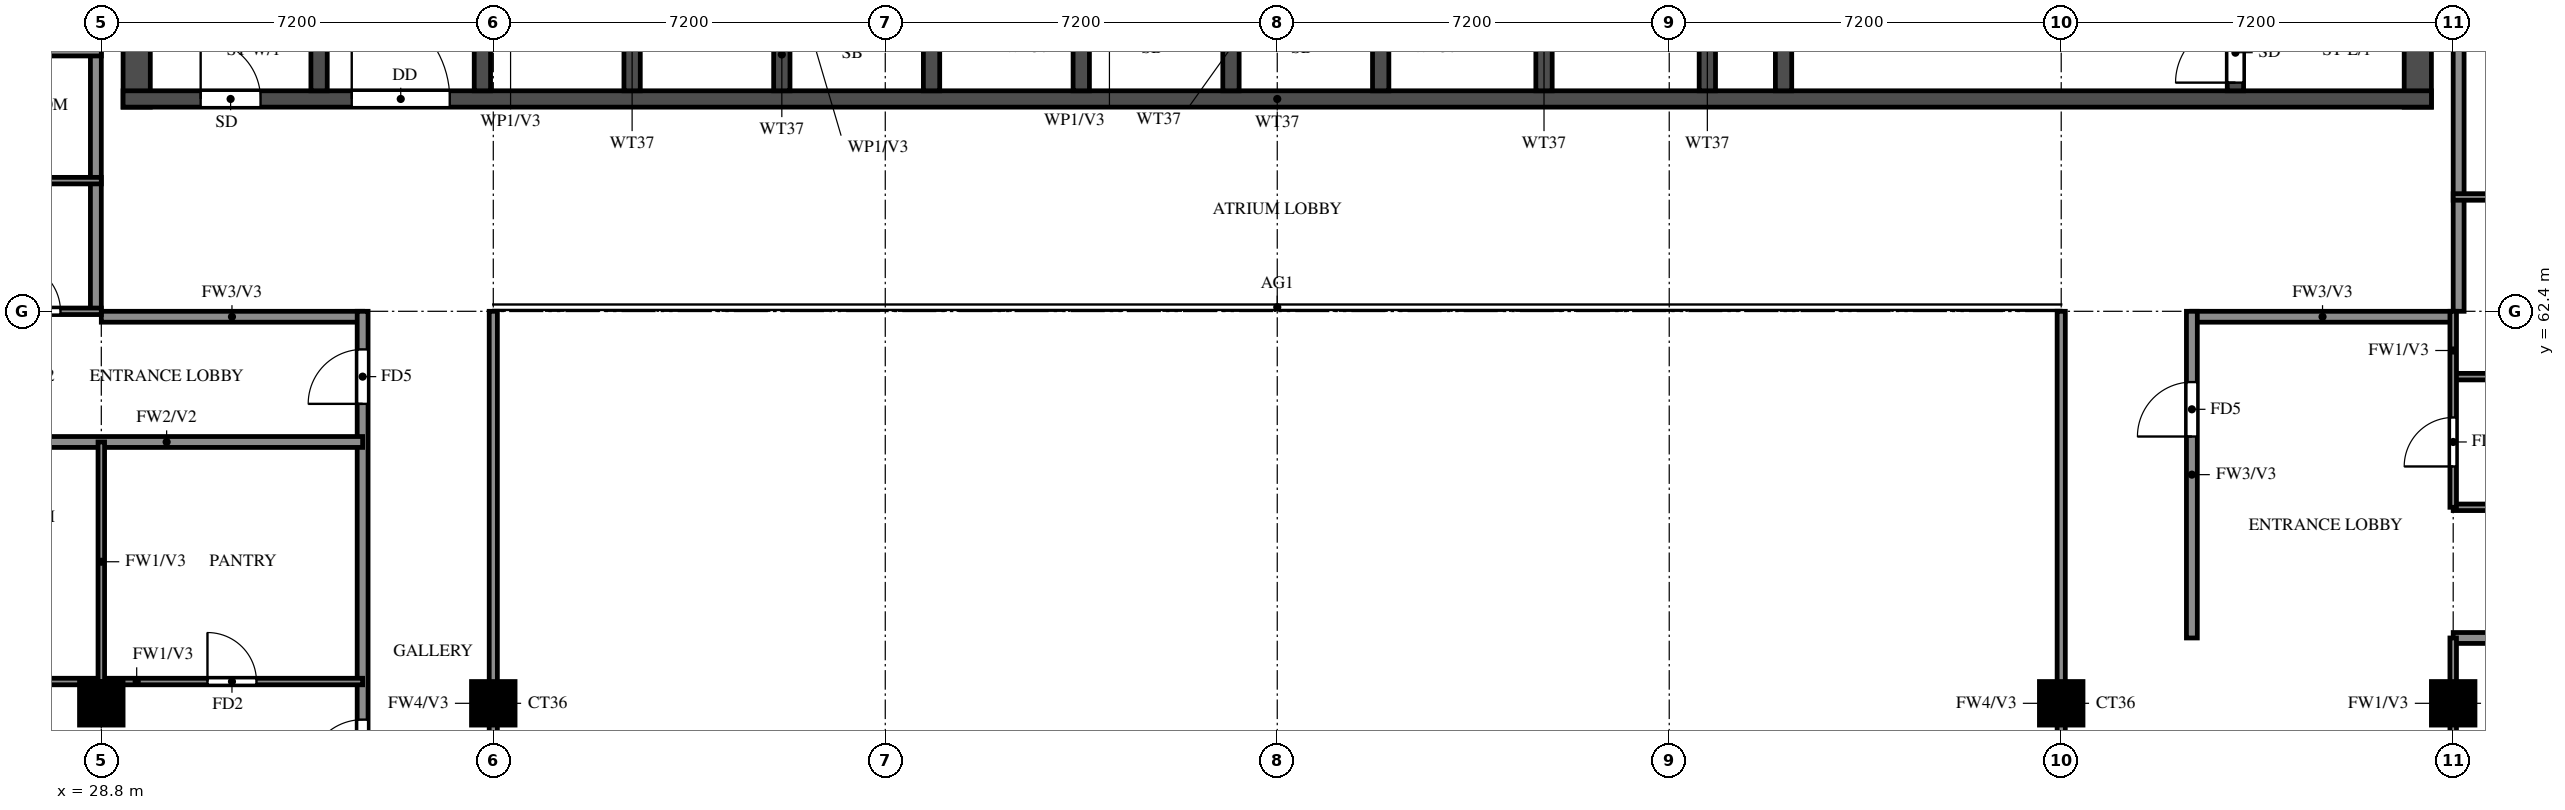
"""IFC4 building model, lengths in metres.
Left out: names, types, materials, properties, quantities, classifications, styles, units other than length and angle.
Written with IfcOpenShell. Run it as: python <this file> out.ifc"""

import sys

from ifc_helpers import new_model, si_unit, direction, frame, frame_2d, origin, origin_2d, place, context, subcontext, project, spatial, rectangle, extrude, source, transform, mapped, element, fill, save


model = new_model("IFC4")
c1 = context("Model", 3, precision=1e-05, world=origin(), true_north=direction((0.0, 1.0)))
c2 = subcontext(c1, "Body", "Model", "MODEL_VIEW")
j1 = project(units=[si_unit("LENGTHUNIT", "METRE"), si_unit("PLANEANGLEUNIT", "RADIAN")], contexts=[c1])
p1 = place(None, origin())
s1 = spatial("IfcSite", under=j1, at=p1, CompositionType="ELEMENT")
p2 = place(p1, origin())
s2 = spatial("IfcBuilding", under=s1, at=p2, CompositionType="ELEMENT")
p3 = place(p2, frame((0.0, 0.0, 243.0)))
s3 = spatial("IfcBuildingStorey", under=s2, at=p3, CompositionType="ELEMENT", Elevation=243.0)
m1 = source(origin(), c2, "Body", "SweptSolid", [
    extrude(rectangle(XDim=0.8, YDim=0.8, at=origin_2d()), origin(), (0.0, 0.0, 1.0), 3.22),
])
for number, where, z_axis, x_axis in (
    (1, (28.8, 55.2, 0.0), (0.0, 0.0, 1.0), (1.0, 0.0, 0.0)),
    (2, (36.0, 55.2, 0.0), (0.0, 0.0, 1.0), (1.0, 0.0, 0.0)),
    (3, (64.8, 55.2, 0.0), (0.0, 0.0, 1.0), (1.0, 0.0, 0.0)),
    (4, (72.0, 55.2, 0.0), (0.0, 0.0, 1.0), (1.0, 0.0, 0.0)),
):
    element("IfcColumn", number, at=place(p3, frame(where, z_axis=z_axis, x_axis=x_axis)), inside=s3, PredefinedType="COLUMN", context=c2, shape_type="MappedRepresentation", body=[
        mapped(m1, transform((0.0, 0.0, 0.0))),
    ])
for number, where, z_axis, x_axis in (
    (5, (29.45, 66.15, 0.0), (0.0, 0.0, 1.0), (0.0, 1.0, 0.0)),
    (6, (71.35, 66.15, 0.0), (0.0, 0.0, 1.0), (0.0, 1.0, 0.0)),
):
    element("IfcWall", number, at=place(p3, frame(where, z_axis=z_axis, x_axis=x_axis)), inside=s3, PredefinedType="SHEAR", context=c2, shape_type="SweptSolid", body=[
        extrude(rectangle(XDim=11.85, YDim=0.5, at=frame_2d((5.925, 0.0))), origin(), (0.0, 0.0, 1.0), 3.22),
    ])
p4 = place(p3, frame((29.2, 66.3, 0.0), z_axis=(0.0, 0.0, 1.0), x_axis=(1.0, 0.0, 0.0)))
e7 = element("IfcWall", 7, at=p4, inside=s3, PredefinedType="SHEAR", context=c2, shape_type="SweptSolid", body=[
    extrude(rectangle(XDim=42.4, YDim=0.3, at=frame_2d((21.2, 0.0))), origin(), (0.0, 0.0, 1.0), 3.22),
])
p5 = place(p4, frame((1.425, 0.0, 0.0)))
e8 = element("IfcOpeningElement", 8, at=p5, cuts=e7, PredefinedType="OPENING", context=c2, shape_type="SweptSolid", body=[
    extrude(rectangle(XDim=1.1, YDim=2.1, at=frame_2d((0.55, 1.05))), frame((0.0, 0.16, 0.0), z_axis=(0.0, -1.0, 0.0), x_axis=(1.0, 0.0, 0.0)), (0.0, 0.0, 1.0), 0.32),
])
p6 = place(p4, frame((4.2, 0.0, 0.0)))
e9 = element("IfcOpeningElement", 9, at=p6, cuts=e7, PredefinedType="OPENING", context=c2, shape_type="SweptSolid", body=[
    extrude(rectangle(XDim=1.8, YDim=2.1, at=frame_2d((0.9, 1.05))), frame((0.0, 0.16, 0.0), z_axis=(0.0, -1.0, 0.0), x_axis=(1.0, 0.0, 0.0)), (0.0, 0.0, 1.0), 0.32),
])
p7 = place(p3, frame((32.8, 66.45, 0.0), z_axis=(0.0, 0.0, 1.0), x_axis=(0.0, 1.0, 0.0)))
e10 = element("IfcWall", 10, at=p7, inside=s3, PredefinedType="SHEAR", context=c2, shape_type="SweptSolid", body=[
    extrude(rectangle(XDim=11.05, YDim=0.3, at=frame_2d((5.525, 0.0))), origin(), (0.0, 0.0, 1.0), 3.22),
])
p8 = place(p3, frame((68.0, 66.45, 0.0), z_axis=(0.0, 0.0, 1.0), x_axis=(0.0, 1.0, 0.0)))
e11 = element("IfcWall", 11, at=p8, inside=s3, PredefinedType="SHEAR", context=c2, shape_type="SweptSolid", body=[
    extrude(rectangle(XDim=11.05, YDim=0.3, at=frame_2d((5.525, 0.0))), origin(), (0.0, 0.0, 1.0), 3.22),
])
p9 = place(p8, frame((0.15, 0.0, 0.0)))
e12 = element("IfcOpeningElement", 12, at=p9, cuts=e11, PredefinedType="OPENING", context=c2, shape_type="SweptSolid", body=[
    extrude(rectangle(XDim=1.1, YDim=2.1, at=frame_2d((0.55, 1.05))), frame((0.0, 0.16, 0.0), z_axis=(0.0, -1.0, 0.0), x_axis=(1.0, 0.0, 0.0)), (0.0, 0.0, 1.0), 0.32),
])
p10 = place(p3, frame((59.7, 66.45, 0.0), z_axis=(0.0, 0.0, 1.0), x_axis=(0.0, 1.0, 0.0)))
e13 = element("IfcWall", 13, at=p10, inside=s3, PredefinedType="SHEAR", context=c2, shape_type="SweptSolid", body=[
    extrude(rectangle(XDim=6.175, YDim=0.3, at=frame_2d((3.087, 0.0))), origin(), (0.0, 0.0, 1.0), 3.22),
])
p11 = place(p10, frame((3.85, 0.0, 0.0)))
e14 = element("IfcOpeningElement", 14, at=p11, cuts=e13, PredefinedType="OPENING", context=c2, shape_type="SweptSolid", body=[
    extrude(rectangle(XDim=1.2, YDim=2.1, at=frame_2d((0.6, 1.05))), frame((0.0, 0.16, 0.0), z_axis=(0.0, -1.0, 0.0), x_axis=(1.0, 0.0, 0.0)), (0.0, 0.0, 1.0), 0.32),
])
for number, where, z_axis, x_axis in (
    (15, (35.8, 66.45, 0.0), (0.0, 0.0, 1.0), (0.0, 1.0, 0.0)),
    (16, (38.55, 66.45, 0.0), (0.0, 0.0, 1.0), (0.0, 1.0, 0.0)),
    (17, (41.3, 66.45, 0.0), (0.0, 0.0, 1.0), (0.0, 1.0, 0.0)),
    (18, (44.05, 66.45, 0.0), (0.0, 0.0, 1.0), (0.0, 1.0, 0.0)),
    (19, (46.8, 66.45, 0.0), (0.0, 0.0, 1.0), (0.0, 1.0, 0.0)),
    (20, (49.55, 66.45, 0.0), (0.0, 0.0, 1.0), (0.0, 1.0, 0.0)),
    (21, (52.3, 66.45, 0.0), (0.0, 0.0, 1.0), (0.0, 1.0, 0.0)),
    (22, (55.3, 66.45, 0.0), (0.0, 0.0, 1.0), (0.0, 1.0, 0.0)),
    (23, (58.3, 66.45, 0.0), (0.0, 0.0, 1.0), (0.0, 1.0, 0.0)),
):
    element("IfcWall", number, at=place(p3, frame(where, z_axis=z_axis, x_axis=x_axis)), inside=s3, PredefinedType="SHEAR", context=c2, shape_type="SweptSolid", body=[
        extrude(rectangle(XDim=2.425, YDim=0.3, at=frame_2d((1.212, 0.0))), origin(), (0.0, 0.0, 1.0), 3.22),
    ])
for number, where, z_axis, x_axis in (
    (24, (28.8, 62.3, 0.0), (0.0, 0.0, 1.0), (1.0, 0.0, 0.0)),
    (25, (67.2, 62.3, 0.0), (0.0, 0.0, 1.0), (1.0, 0.0, 0.0)),
):
    element("IfcWall", number, at=place(p3, frame(where, z_axis=z_axis, x_axis=x_axis)), inside=s3, PredefinedType="SOLIDWALL", context=c2, shape_type="SweptSolid", body=[
        extrude(rectangle(XDim=4.8, YDim=0.2, at=frame_2d((2.4, 0.0))), origin(), (0.0, 0.0, 1.0), 3.22),
    ])
p12 = place(p3, frame((28.7, 62.4, 0.0), z_axis=(0.0, 0.0, 1.0), x_axis=(0.0, 1.0, 0.0)))
e26 = element("IfcWall", 26, at=p12, inside=s3, PredefinedType="SOLIDWALL", context=c2, shape_type="SweptSolid", body=[
    extrude(rectangle(XDim=15.6, YDim=0.2, at=frame_2d((7.8, 0.0))), origin(), (0.0, 0.0, 1.0), 3.22),
])
p13 = place(p3, frame((33.6, 45.6, 0.0), z_axis=(0.0, 0.0, 1.0), x_axis=(0.0, 1.0, 0.0)))
e27 = element("IfcWall", 27, at=p13, inside=s3, PredefinedType="SOLIDWALL", context=c2, shape_type="SweptSolid", body=[
    extrude(rectangle(XDim=16.8, YDim=0.2, at=frame_2d((8.4, 0.0))), origin(), (0.0, 0.0, 1.0), 3.22),
])
p14 = place(p13, frame((0.7, 0.0, 0.0)))
e28 = element("IfcOpeningElement", 28, at=p14, cuts=e27, PredefinedType="OPENING", context=c2, shape_type="SweptSolid", body=[
    extrude(rectangle(XDim=1.0, YDim=2.1, at=frame_2d((0.5, 1.05))), frame((0.0, 0.11, 0.0), z_axis=(0.0, -1.0, 0.0), x_axis=(1.0, 0.0, 0.0)), (0.0, 0.0, 1.0), 0.22),
])
p15 = place(p13, frame((8.3, 0.0, 0.0)))
e29 = element("IfcOpeningElement", 29, at=p15, cuts=e27, PredefinedType="OPENING", context=c2, shape_type="SweptSolid", body=[
    extrude(rectangle(XDim=1.0, YDim=2.1, at=frame_2d((0.5, 1.05))), frame((0.0, 0.11, 0.0), z_axis=(0.0, -1.0, 0.0), x_axis=(1.0, 0.0, 0.0)), (0.0, 0.0, 1.0), 0.22),
])
p16 = place(p13, frame((15.1, 0.0, 0.0)))
e30 = element("IfcOpeningElement", 30, at=p16, cuts=e27, PredefinedType="OPENING", context=c2, shape_type="SweptSolid", body=[
    extrude(rectangle(XDim=1.0, YDim=2.1, at=frame_2d((0.5, 1.05))), frame((0.0, 0.11, 0.0), z_axis=(0.0, -1.0, 0.0), x_axis=(1.0, 0.0, 0.0)), (0.0, 0.0, 1.0), 0.22),
])
p17 = place(p3, frame((67.2, 56.4, 0.0), z_axis=(0.0, 0.0, 1.0), x_axis=(0.0, 1.0, 0.0)))
e31 = element("IfcWall", 31, at=p17, inside=s3, PredefinedType="SOLIDWALL", context=c2, shape_type="SweptSolid", body=[
    extrude(rectangle(XDim=6.0, YDim=0.2, at=frame_2d((3.0, 0.0))), origin(), (0.0, 0.0, 1.0), 3.22),
])
p18 = place(p17, frame((3.7, 0.0, 0.0)))
e32 = element("IfcOpeningElement", 32, at=p18, cuts=e31, PredefinedType="OPENING", context=c2, shape_type="SweptSolid", body=[
    extrude(rectangle(XDim=1.0, YDim=2.1, at=frame_2d((0.5, 1.05))), frame((0.0, 0.11, 0.0), z_axis=(0.0, -1.0, 0.0), x_axis=(1.0, 0.0, 0.0)), (0.0, 0.0, 1.0), 0.22),
])
p19 = place(p3, frame((72.1, 62.4, 0.0), z_axis=(0.0, 0.0, 1.0), x_axis=(0.0, 1.0, 0.0)))
e33 = element("IfcWall", 33, at=p19, inside=s3, PredefinedType="SOLIDWALL", context=c2, shape_type="SweptSolid", body=[
    extrude(rectangle(XDim=15.6, YDim=0.2, at=frame_2d((7.8, 0.0))), origin(), (0.0, 0.0, 1.0), 3.22),
])
p20 = place(p3, frame((72.0, 56.4, 0.0), z_axis=(0.0, 0.0, 1.0), x_axis=(1.0, 0.0, 0.0)))
e34 = element("IfcWall", 34, at=p20, inside=s3, PredefinedType="SOLIDWALL", context=c2, shape_type="SweptSolid", body=[
    extrude(rectangle(XDim=2.4, YDim=0.2, at=frame_2d((1.2, 0.0))), origin(), (0.0, 0.0, 1.0), 3.22),
])
p21 = place(p3, frame((26.4, 60.0, 0.0), z_axis=(0.0, 0.0, 1.0), x_axis=(1.0, 0.0, 0.0)))
e35 = element("IfcWall", 35, at=p21, inside=s3, PredefinedType="SOLIDWALL", context=c2, shape_type="SweptSolid", body=[
    extrude(rectangle(XDim=7.2, YDim=0.2, at=frame_2d((3.6, 0.0))), origin(), (0.0, 0.0, 1.0), 3.22),
])
p22 = place(p3, frame((25.3, 55.6, 0.0), z_axis=(0.0, 0.0, 1.0), x_axis=(1.0, 0.0, 0.0)))
e36 = element("IfcWall", 36, at=p22, inside=s3, PredefinedType="PARTITIONING", context=c2, shape_type="SweptSolid", body=[
    extrude(rectangle(XDim=8.3, YDim=0.12, at=frame_2d((4.15, 0.0))), origin(), (0.0, 0.0, 1.0), 3.22),
])
p23 = place(p22, frame((5.45, 0.0, 0.0)))
e37 = element("IfcOpeningElement", 37, at=p23, cuts=e36, PredefinedType="OPENING", context=c2, shape_type="SweptSolid", body=[
    extrude(rectangle(XDim=0.9, YDim=2.1, at=frame_2d((0.45, 1.05))), frame((0.0, 0.07, 0.0), z_axis=(0.0, -1.0, 0.0), x_axis=(1.0, 0.0, 0.0)), (0.0, 0.0, 1.0), 0.14),
])
p24 = place(p3, frame((72.0, 58.8, 0.0), z_axis=(0.0, 0.0, 1.0), x_axis=(1.0, 0.0, 0.0)))
e38 = element("IfcWall", 38, at=p24, inside=s3, PredefinedType="PARTITIONING", context=c2, shape_type="SweptSolid", body=[
    extrude(rectangle(XDim=2.4, YDim=0.12, at=frame_2d((1.2, 0.0))), origin(), (0.0, 0.0, 1.0), 3.22),
])
p25 = place(p3, frame((72.0, 61.2, 0.0), z_axis=(0.0, 0.0, 1.0), x_axis=(1.0, 0.0, 0.0)))
e39 = element("IfcWall", 39, at=p25, inside=s3, PredefinedType="PARTITIONING", context=c2, shape_type="SweptSolid", body=[
    extrude(rectangle(XDim=3.5, YDim=0.12, at=frame_2d((1.75, 0.0))), origin(), (0.0, 0.0, 1.0), 3.22),
])
p26 = place(p25, frame((1.3, 0.0, 0.0)))
e40 = element("IfcOpeningElement", 40, at=p26, cuts=e39, PredefinedType="OPENING", context=c2, shape_type="SweptSolid", body=[
    extrude(rectangle(XDim=0.9, YDim=2.1, at=frame_2d((0.45, 1.05))), frame((0.0, 0.07, 0.0), z_axis=(0.0, -1.0, 0.0), x_axis=(1.0, 0.0, 0.0)), (0.0, 0.0, 1.0), 0.14),
])
p27 = place(p3, frame((26.4, 62.4, 0.0), z_axis=(0.0, 0.0, 1.0), x_axis=(1.0, 0.0, 0.0)))
e41 = element("IfcWall", 41, at=p27, inside=s3, PredefinedType="PARTITIONING", context=c2, shape_type="SweptSolid", body=[
    extrude(rectangle(XDim=2.4, YDim=0.12, at=frame_2d((1.2, 0.0))), origin(), (0.0, 0.0, 1.0), 3.22),
])
p28 = place(p27, frame((0.75, 0.0, 0.0)))
e42 = element("IfcOpeningElement", 42, at=p28, cuts=e41, PredefinedType="OPENING", context=c2, shape_type="SweptSolid", body=[
    extrude(rectangle(XDim=0.9, YDim=2.1, at=frame_2d((0.45, 1.05))), frame((0.0, 0.07, 0.0), z_axis=(0.0, -1.0, 0.0), x_axis=(1.0, 0.0, 0.0)), (0.0, 0.0, 1.0), 0.14),
])
p29 = place(p3, frame((72.0, 64.5, 0.0), z_axis=(0.0, 0.0, 1.0), x_axis=(1.0, 0.0, 0.0)))
e43 = element("IfcWall", 43, at=p29, inside=s3, PredefinedType="PARTITIONING", context=c2, shape_type="SweptSolid", body=[
    extrude(rectangle(XDim=3.5, YDim=0.12, at=frame_2d((1.75, 0.0))), origin(), (0.0, 0.0, 1.0), 3.22),
])
p30 = place(p3, frame((25.3, 64.8, 0.0), z_axis=(0.0, 0.0, 1.0), x_axis=(1.0, 0.0, 0.0)))
e44 = element("IfcWall", 44, at=p30, inside=s3, PredefinedType="PARTITIONING", context=c2, shape_type="SweptSolid", body=[
    extrude(rectangle(XDim=3.5, YDim=0.12, at=frame_2d((1.75, 0.0))), origin(), (0.0, 0.0, 1.0), 3.22),
])
p31 = place(p30, frame((1.3, 0.0, 0.0)))
e45 = element("IfcOpeningElement", 45, at=p31, cuts=e44, PredefinedType="OPENING", context=c2, shape_type="SweptSolid", body=[
    extrude(rectangle(XDim=0.9, YDim=2.1, at=frame_2d((0.45, 1.05))), frame((0.0, 0.07, 0.0), z_axis=(0.0, -1.0, 0.0), x_axis=(1.0, 0.0, 0.0)), (0.0, 0.0, 1.0), 0.14),
])
p32 = place(p3, frame((25.3, 67.15, 0.0), z_axis=(0.0, 0.0, 1.0), x_axis=(1.0, 0.0, 0.0)))
e46 = element("IfcWall", 46, at=p32, inside=s3, PredefinedType="PARTITIONING", context=c2, shape_type="SweptSolid", body=[
    extrude(rectangle(XDim=3.5, YDim=0.12, at=frame_2d((1.75, 0.0))), origin(), (0.0, 0.0, 1.0), 3.22),
])
p33 = place(p3, frame((28.8, 55.6, 0.0), z_axis=(0.0, 0.0, 1.0), x_axis=(0.0, 1.0, 0.0)))
e47 = element("IfcWall", 47, at=p33, inside=s3, PredefinedType="PARTITIONING", context=c2, shape_type="SweptSolid", body=[
    extrude(rectangle(XDim=4.4, YDim=0.12, at=frame_2d((2.2, 0.0))), origin(), (0.0, 0.0, 1.0), 3.22),
])
p34 = place(p3, frame((72.0, 54.0, 0.0), z_axis=(0.0, 0.0, 1.0), x_axis=(0.0, 1.0, 0.0)))
e48 = element("IfcWall", 48, at=p34, inside=s3, PredefinedType="PARTITIONING", context=c2, shape_type="SweptSolid", body=[
    extrude(rectangle(XDim=2.4, YDim=0.12, at=frame_2d((1.2, 0.0))), origin(), (0.0, 0.0, 1.0), 3.22),
])
p35 = place(p3, frame((72.0, 58.8, 0.0), z_axis=(0.0, 0.0, 1.0), x_axis=(0.0, 1.0, 0.0)))
e49 = element("IfcWall", 49, at=p35, inside=s3, PredefinedType="PARTITIONING", context=c2, shape_type="SweptSolid", body=[
    extrude(rectangle(XDim=3.6, YDim=0.12, at=frame_2d((1.8, 0.0))), origin(), (0.0, 0.0, 1.0), 3.22),
])
p36 = place(p35, frame((0.75, 0.0, 0.0)))
e50 = element("IfcOpeningElement", 50, at=p36, cuts=e49, PredefinedType="OPENING", context=c2, shape_type="SweptSolid", body=[
    extrude(rectangle(XDim=0.9, YDim=2.1, at=frame_2d((0.45, 1.05))), frame((0.0, 0.07, 0.0), z_axis=(0.0, -1.0, 0.0), x_axis=(1.0, 0.0, 0.0)), (0.0, 0.0, 1.0), 0.14),
])
for number, where, z_axis, x_axis in (
    (51, (36.0, 48.0, 0.0), (0.0, 0.0, 1.0), (0.0, 1.0, 0.0)),
    (52, (64.8, 48.0, 0.0), (0.0, 0.0, 1.0), (0.0, 1.0, 0.0)),
):
    element("IfcWall", number, at=place(p3, frame(where, z_axis=z_axis, x_axis=x_axis)), inside=s3, PredefinedType="SOLIDWALL", context=c2, shape_type="SweptSolid", body=[
        extrude(rectangle(XDim=14.4, YDim=0.15, at=frame_2d((7.2, 0.0))), origin(), (0.0, 0.0, 1.0), 2.32),
    ])
p37 = place(p5, origin())
e53 = element("IfcDoor", 53, at=p37, inside=s3, OperationType="SINGLE_SWING_LEFT", PredefinedType="DOOR", context=c2, shape_type="SweptSolid", body=[
    extrude(rectangle(XDim=1.1, YDim=2.1, at=frame_2d((0.55, 1.05))), frame((0.0, 0.025, 0.0), z_axis=(0.0, -1.0, 0.0), x_axis=(1.0, 0.0, 0.0)), (0.0, 0.0, 1.0), 0.05),
])
fill(e8, e53)
p38 = place(p9, origin())
e54 = element("IfcDoor", 54, at=p38, inside=s3, OperationType="SINGLE_SWING_RIGHT", PredefinedType="DOOR", context=c2, shape_type="SweptSolid", body=[
    extrude(rectangle(XDim=1.1, YDim=2.1, at=frame_2d((0.55, 1.05))), frame((0.0, 0.025, 0.0), z_axis=(0.0, -1.0, 0.0), x_axis=(1.0, 0.0, 0.0)), (0.0, 0.0, 1.0), 0.05),
])
fill(e12, e54)
p39 = place(p6, origin())
e55 = element("IfcDoor", 55, at=p39, inside=s3, OperationType="DOUBLE_DOOR_SINGLE_SWING", PredefinedType="DOOR", context=c2, shape_type="SweptSolid", body=[
    extrude(rectangle(XDim=1.8, YDim=2.1, at=frame_2d((0.9, 1.05))), frame((0.0, 0.025, 0.0), z_axis=(0.0, -1.0, 0.0), x_axis=(1.0, 0.0, 0.0)), (0.0, 0.0, 1.0), 0.05),
])
fill(e9, e55)
p40 = place(p15, origin())
e56 = element("IfcDoor", 56, at=p40, inside=s3, OperationType="SINGLE_SWING_RIGHT", PredefinedType="DOOR", context=c2, shape_type="SweptSolid", body=[
    extrude(rectangle(XDim=1.0, YDim=2.1, at=frame_2d((0.5, 1.05))), frame((0.0, 0.025, 0.0), z_axis=(0.0, -1.0, 0.0), x_axis=(1.0, 0.0, 0.0)), (0.0, 0.0, 1.0), 0.05),
])
fill(e29, e56)
p41 = place(p23, origin())
e57 = element("IfcDoor", 57, at=p41, inside=s3, OperationType="SINGLE_SWING_LEFT", PredefinedType="DOOR", context=c2, shape_type="SweptSolid", body=[
    extrude(rectangle(XDim=0.9, YDim=2.1, at=frame_2d((0.45, 1.05))), frame((0.0, 0.025, 0.0), z_axis=(0.0, -1.0, 0.0), x_axis=(1.0, 0.0, 0.0)), (0.0, 0.0, 1.0), 0.05),
])
fill(e37, e57)
p42 = place(p28, origin())
e58 = element("IfcDoor", 58, at=p42, inside=s3, OperationType="SINGLE_SWING_RIGHT", PredefinedType="DOOR", context=c2, shape_type="SweptSolid", body=[
    extrude(rectangle(XDim=0.9, YDim=2.1, at=frame_2d((0.45, 1.05))), frame((0.0, 0.025, 0.0), z_axis=(0.0, -1.0, 0.0), x_axis=(1.0, 0.0, 0.0)), (0.0, 0.0, 1.0), 0.05),
])
fill(e42, e58)
p43 = place(p16, origin())
e59 = element("IfcDoor", 59, at=p43, inside=s3, OperationType="SINGLE_SWING_LEFT", PredefinedType="DOOR", context=c2, shape_type="SweptSolid", body=[
    extrude(rectangle(XDim=1.0, YDim=2.1, at=frame_2d((0.5, 1.05))), frame((0.0, 0.025, 0.0), z_axis=(0.0, -1.0, 0.0), x_axis=(1.0, 0.0, 0.0)), (0.0, 0.0, 1.0), 0.05),
])
fill(e30, e59)
p44 = place(p36, origin())
e60 = element("IfcDoor", 60, at=p44, inside=s3, OperationType="SINGLE_SWING_LEFT", PredefinedType="DOOR", context=c2, shape_type="SweptSolid", body=[
    extrude(rectangle(XDim=0.9, YDim=2.1, at=frame_2d((0.45, 1.05))), frame((0.0, 0.025, 0.0), z_axis=(0.0, -1.0, 0.0), x_axis=(1.0, 0.0, 0.0)), (0.0, 0.0, 1.0), 0.05),
])
fill(e50, e60)
p45 = place(p18, origin())
e61 = element("IfcDoor", 61, at=p45, inside=s3, OperationType="SINGLE_SWING_RIGHT", PredefinedType="DOOR", context=c2, shape_type="SweptSolid", body=[
    extrude(rectangle(XDim=1.0, YDim=2.1, at=frame_2d((0.5, 1.05))), frame((0.0, 0.025, 0.0), z_axis=(0.0, -1.0, 0.0), x_axis=(1.0, 0.0, 0.0)), (0.0, 0.0, 1.0), 0.05),
])
fill(e32, e61)
save(model, sys.argv[1])
